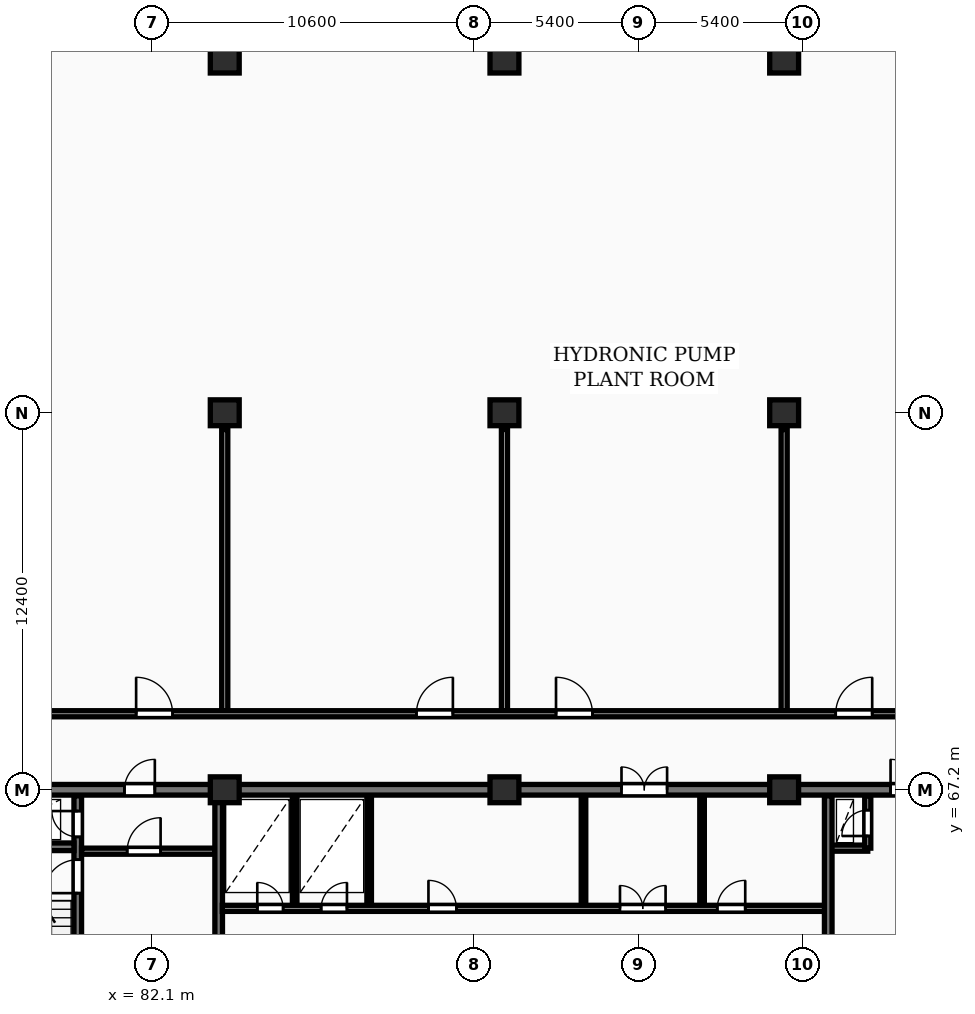
"""IFC4 building model, lengths in metres.
Left out: names, types, materials, properties, quantities, classifications, styles, units other than length and angle.
Written with IfcOpenShell. Run it as: python <this file> out.ifc"""

import sys

from ifc_helpers import new_model, si_unit, direction, frame, frame_2d, origin, origin_2d, place, context, subcontext, project, spatial, rectangle, extrude, element, fill, save


model = new_model("IFC4")
c1 = context("Model", 3, precision=1e-05, world=origin(), true_north=direction((0.0, 1.0)))
c2 = subcontext(c1, "Body", "Model", "MODEL_VIEW")
j1 = project(units=[si_unit("LENGTHUNIT", "METRE"), si_unit("PLANEANGLEUNIT", "RADIAN")], contexts=[c1])
p1 = place(None, origin())
s1 = spatial("IfcSite", under=j1, at=p1, CompositionType="ELEMENT")
p2 = place(p1, origin())
s2 = spatial("IfcBuilding", under=s1, at=p2, CompositionType="ELEMENT")
p3 = place(p2, frame((0.0, 0.0, 157.3)))
s3 = spatial("IfcBuildingStorey", under=s2, at=p3, CompositionType="ELEMENT", Elevation=157.3)
for number, where, z_axis, x_axis in (
    (1, (84.5, 67.2, 0.0), (0.0, 0.0, 1.0), (1.0, 0.0, 0.0)),
    (2, (84.5, 79.6, 0.0), (0.0, 0.0, 1.0), (1.0, 0.0, 0.0)),
    (3, (84.5, 91.2, 0.0), (0.0, 0.0, 1.0), (1.0, 0.0, 0.0)),
    (4, (93.7, 67.2, 0.0), (0.0, 0.0, 1.0), (1.0, 0.0, 0.0)),
    (5, (93.7, 79.6, 0.0), (0.0, 0.0, 1.0), (1.0, 0.0, 0.0)),
    (6, (93.7, 91.2, 0.0), (0.0, 0.0, 1.0), (1.0, 0.0, 0.0)),
    (7, (102.9, 67.2, 0.0), (0.0, 0.0, 1.0), (1.0, 0.0, 0.0)),
    (8, (102.9, 79.6, 0.0), (0.0, 0.0, 1.0), (1.0, 0.0, 0.0)),
    (9, (102.9, 91.2, 0.0), (0.0, 0.0, 1.0), (1.0, 0.0, 0.0)),
):
    element("IfcColumn", number, at=place(p3, frame(where, z_axis=z_axis, x_axis=x_axis)), inside=s3, PredefinedType="COLUMN", context=c2, shape_type="SweptSolid", body=[
        extrude(rectangle(XDim=0.95, YDim=0.85, at=origin_2d()), origin(), (0.0, 0.0, 1.0), 4.8),
    ])
p4 = place(p3, frame((75.95, 67.2, 0.0), z_axis=(0.0, 0.0, 1.0), x_axis=(1.0, 0.0, 0.0)))
e10 = element("IfcWall", 10, at=p4, inside=s3, PredefinedType="SHEAR", context=c2, shape_type="SweptSolid", body=[
    extrude(rectangle(XDim=36.3, YDim=0.35, at=frame_2d((18.15, 0.0))), origin(), (0.0, 0.0, 1.0), 4.8),
])
p5 = place(p4, frame((5.25, 0.0, 0.0)))
e11 = element("IfcOpeningElement", 11, at=p5, cuts=e10, PredefinedType="OPENING", context=c2, shape_type="SweptSolid", body=[
    extrude(rectangle(XDim=1.0, YDim=2.15, at=frame_2d((0.5, 1.075))), frame((0.0, 0.185, 0.0), z_axis=(0.0, -1.0, 0.0), x_axis=(1.0, 0.0, 0.0)), (0.0, 0.0, 1.0), 0.37),
])
p6 = place(p4, frame((21.6, 0.0, 0.0)))
e12 = element("IfcOpeningElement", 12, at=p6, cuts=e10, PredefinedType="OPENING", context=c2, shape_type="SweptSolid", body=[
    extrude(rectangle(XDim=1.5, YDim=2.2, at=frame_2d((0.75, 1.1))), frame((0.0, 0.185, 0.0), z_axis=(0.0, -1.0, 0.0), x_axis=(1.0, 0.0, 0.0)), (0.0, 0.0, 1.0), 0.37),
])
p7 = place(p4, frame((30.45, 0.0, 0.0)))
e13 = element("IfcOpeningElement", 13, at=p7, cuts=e10, PredefinedType="OPENING", context=c2, shape_type="SweptSolid", body=[
    extrude(rectangle(XDim=1.0, YDim=2.15, at=frame_2d((0.5, 1.075))), frame((0.0, 0.185, 0.0), z_axis=(0.0, -1.0, 0.0), x_axis=(1.0, 0.0, 0.0)), (0.0, 0.0, 1.0), 0.37),
])
p8 = place(p3, frame((79.665, 55.4, 0.0), z_axis=(0.0, 0.0, 1.0), x_axis=(0.0, 1.0, 0.0)))
e14 = element("IfcWall", 14, at=p8, inside=s3, PredefinedType="SHEAR", context=c2, shape_type="SweptSolid", body=[
    extrude(rectangle(XDim=11.6, YDim=0.25, at=frame_2d((5.8, 0.0))), origin(), (0.0, 0.0, 1.0), 4.8),
])
p9 = place(p8, frame((0.55, 0.0, 0.0)))
e15 = element("IfcOpeningElement", 15, at=p9, cuts=e14, PredefinedType="OPENING", context=c2, shape_type="SweptSolid", body=[
    extrude(rectangle(XDim=0.85, YDim=2.05, at=frame_2d((0.425, 1.025))), frame((0.0, 0.135, 0.0), z_axis=(0.0, -1.0, 0.0), x_axis=(1.0, 0.0, 0.0)), (0.0, 0.0, 1.0), 0.27),
])
p10 = place(p8, frame((8.4, 0.0, 0.0)))
e16 = element("IfcOpeningElement", 16, at=p10, cuts=e14, PredefinedType="OPENING", context=c2, shape_type="SweptSolid", body=[
    extrude(rectangle(XDim=1.1, YDim=2.1, at=frame_2d((0.55, 1.05))), frame((0.0, 0.135, 0.0), z_axis=(0.0, -1.0, 0.0), x_axis=(1.0, 0.0, 0.0)), (0.0, 0.0, 1.0), 0.27),
])
p11 = place(p8, frame((10.25, 0.0, 0.0)))
e17 = element("IfcOpeningElement", 17, at=p11, cuts=e14, PredefinedType="OPENING", context=c2, shape_type="SweptSolid", body=[
    extrude(rectangle(XDim=0.85, YDim=2.05, at=frame_2d((0.425, 1.025))), frame((0.0, 0.135, 0.0), z_axis=(0.0, -1.0, 0.0), x_axis=(1.0, 0.0, 0.0)), (0.0, 0.0, 1.0), 0.27),
])
p12 = place(p3, frame((76.3, 65.325, 0.0), z_axis=(0.0, 0.0, 1.0), x_axis=(1.0, 0.0, 0.0)))
e18 = element("IfcWall", 18, at=p12, inside=s3, PredefinedType="SHEAR", context=c2, shape_type="SweptSolid", body=[
    extrude(rectangle(XDim=3.24, YDim=0.25, at=frame_2d((1.62, 0.0))), origin(), (0.0, 0.0, 1.0), 4.8),
])
p13 = place(p3, frame((79.79, 65.18, 0.0), z_axis=(0.0, 0.0, 1.0), x_axis=(1.0, 0.0, 0.0)))
e19 = element("IfcWall", 19, at=p13, inside=s3, PredefinedType="PARTITIONING", context=c2, shape_type="SweptSolid", body=[
    extrude(rectangle(XDim=4.39, YDim=0.2, at=frame_2d((2.195, 0.0))), origin(), (0.0, 0.0, 1.0), 4.48),
])
p14 = place(p13, frame((1.5, 0.0, 0.0)))
e20 = element("IfcOpeningElement", 20, at=p14, cuts=e19, PredefinedType="OPENING", context=c2, shape_type="SweptSolid", body=[
    extrude(rectangle(XDim=1.1, YDim=2.1, at=frame_2d((0.55, 1.05))), frame((0.0, 0.11, 0.0), z_axis=(0.0, -1.0, 0.0), x_axis=(1.0, 0.0, 0.0)), (0.0, 0.0, 1.0), 0.22),
])
p15 = place(p3, frame((84.3, 55.4, 0.0), z_axis=(0.0, 0.0, 1.0), x_axis=(0.0, 1.0, 0.0)))
e21 = element("IfcWall", 21, at=p15, inside=s3, PredefinedType="SHEAR", context=c2, shape_type="SweptSolid", body=[
    extrude(rectangle(XDim=11.6, YDim=0.25, at=frame_2d((5.8, 0.0))), origin(), (0.0, 0.0, 1.0), 4.8),
])
p16 = place(p15, frame((5.2, 0.0, 0.0)))
e22 = element("IfcOpeningElement", 22, at=p16, cuts=e21, PredefinedType="OPENING", context=c2, shape_type="SweptSolid", body=[
    extrude(rectangle(XDim=1.1, YDim=2.1, at=frame_2d((0.55, 1.05))), frame((0.0, 0.135, 0.0), z_axis=(0.0, -1.0, 0.0), x_axis=(1.0, 0.0, 0.0)), (0.0, 0.0, 1.0), 0.27),
])
for number, where, z_axis, x_axis in (
    (23, (86.8, 63.4, 0.0), (0.0, 0.0, 1.0), (0.0, 1.0, 0.0)),
    (24, (89.25, 63.4, 0.0), (0.0, 0.0, 1.0), (0.0, 1.0, 0.0)),
    (25, (96.3, 63.4, 0.0), (0.0, 0.0, 1.0), (0.0, 1.0, 0.0)),
    (26, (100.2, 63.4, 0.0), (0.0, 0.0, 1.0), (0.0, 1.0, 0.0)),
):
    element("IfcWall", number, at=place(p3, frame(where, z_axis=z_axis, x_axis=x_axis)), inside=s3, PredefinedType="PARTITIONING", context=c2, shape_type="SweptSolid", body=[
        extrude(rectangle(XDim=3.6, YDim=0.15, at=frame_2d((1.8, 0.0))), origin(), (0.0, 0.0, 1.0), 4.48),
    ])
p17 = place(p3, frame((84.42, 63.3, 0.0), z_axis=(0.0, 0.0, 1.0), x_axis=(1.0, 0.0, 0.0)))
e27 = element("IfcWall", 27, at=p17, inside=s3, PredefinedType="PARTITIONING", context=c2, shape_type="SweptSolid", body=[
    extrude(rectangle(XDim=19.83, YDim=0.2, at=frame_2d((9.915, 0.0))), origin(), (0.0, 0.0, 1.0), 4.48),
])
p18 = place(p17, frame((1.15, 0.0, 0.0)))
e28 = element("IfcOpeningElement", 28, at=p18, cuts=e27, PredefinedType="OPENING", context=c2, shape_type="SweptSolid", body=[
    extrude(rectangle(XDim=0.85, YDim=2.05, at=frame_2d((0.425, 1.025))), frame((0.0, 0.11, 0.0), z_axis=(0.0, -1.0, 0.0), x_axis=(1.0, 0.0, 0.0)), (0.0, 0.0, 1.0), 0.22),
])
p19 = place(p17, frame((3.25, 0.0, 0.0)))
e29 = element("IfcOpeningElement", 29, at=p19, cuts=e27, PredefinedType="OPENING", context=c2, shape_type="SweptSolid", body=[
    extrude(rectangle(XDim=0.85, YDim=2.05, at=frame_2d((0.425, 1.025))), frame((0.0, 0.11, 0.0), z_axis=(0.0, -1.0, 0.0), x_axis=(1.0, 0.0, 0.0)), (0.0, 0.0, 1.0), 0.22),
])
p20 = place(p17, frame((13.08, 0.0, 0.0)))
e30 = element("IfcOpeningElement", 30, at=p20, cuts=e27, PredefinedType="OPENING", context=c2, shape_type="SweptSolid", body=[
    extrude(rectangle(XDim=1.5, YDim=2.2, at=frame_2d((0.75, 1.1))), frame((0.0, 0.11, 0.0), z_axis=(0.0, -1.0, 0.0), x_axis=(1.0, 0.0, 0.0)), (0.0, 0.0, 1.0), 0.22),
])
p21 = place(p17, frame((6.78, 0.0, 0.0)))
e31 = element("IfcOpeningElement", 31, at=p21, cuts=e27, PredefinedType="OPENING", context=c2, shape_type="SweptSolid", body=[
    extrude(rectangle(XDim=0.92, YDim=2.08, at=frame_2d((0.46, 1.04))), frame((0.0, 0.11, 0.0), z_axis=(0.0, -1.0, 0.0), x_axis=(1.0, 0.0, 0.0)), (0.0, 0.0, 1.0), 0.22),
])
p22 = place(p17, frame((16.28, 0.0, 0.0)))
e32 = element("IfcOpeningElement", 32, at=p22, cuts=e27, PredefinedType="OPENING", context=c2, shape_type="SweptSolid", body=[
    extrude(rectangle(XDim=0.92, YDim=2.08, at=frame_2d((0.46, 1.04))), frame((0.0, 0.11, 0.0), z_axis=(0.0, -1.0, 0.0), x_axis=(1.0, 0.0, 0.0)), (0.0, 0.0, 1.0), 0.22),
])
p23 = place(p3, frame((104.45, 65.28, 0.0), z_axis=(0.0, 0.0, 1.0), x_axis=(1.0, 0.0, 0.0)))
e33 = element("IfcWall", 33, at=p23, inside=s3, PredefinedType="PARTITIONING", context=c2, shape_type="SweptSolid", body=[
    extrude(rectangle(XDim=1.2, YDim=0.2, at=frame_2d((0.6, 0.0))), origin(), (0.0, 0.0, 1.0), 4.48),
])
p24 = place(p3, frame((105.65, 65.28, 0.0), z_axis=(0.0, 0.0, 1.0), x_axis=(0.0, 1.0, 0.0)))
e34 = element("IfcWall", 34, at=p24, inside=s3, PredefinedType="PARTITIONING", context=c2, shape_type="SweptSolid", body=[
    extrude(rectangle(XDim=1.72, YDim=0.2, at=frame_2d((0.86, 0.0))), origin(), (0.0, 0.0, 1.0), 4.48),
])
p25 = place(p24, frame((0.4, 0.0, 0.0)))
e35 = element("IfcOpeningElement", 35, at=p25, cuts=e34, PredefinedType="OPENING", context=c2, shape_type="SweptSolid", body=[
    extrude(rectangle(XDim=0.85, YDim=2.05, at=frame_2d((0.425, 1.025))), frame((0.0, 0.11, 0.0), z_axis=(0.0, -1.0, 0.0), x_axis=(1.0, 0.0, 0.0)), (0.0, 0.0, 1.0), 0.22),
])
p26 = place(p3, frame((104.35, 58.4, 0.0), z_axis=(0.0, 0.0, 1.0), x_axis=(0.0, 1.0, 0.0)))
e36 = element("IfcWall", 36, at=p26, inside=s3, PredefinedType="SHEAR", context=c2, shape_type="SweptSolid", body=[
    extrude(rectangle(XDim=8.6, YDim=0.25, at=frame_2d((4.3, 0.0))), origin(), (0.0, 0.0, 1.0), 4.8),
])
p27 = place(p26, frame((1.8, 0.0, 0.0)))
e37 = element("IfcOpeningElement", 37, at=p27, cuts=e36, PredefinedType="OPENING", context=c2, shape_type="SweptSolid", body=[
    extrude(rectangle(XDim=1.1, YDim=2.1, at=frame_2d((0.55, 1.05))), frame((0.0, 0.135, 0.0), z_axis=(0.0, -1.0, 0.0), x_axis=(1.0, 0.0, 0.0)), (0.0, 0.0, 1.0), 0.27),
])
for number, where, z_axis, x_axis in (
    (38, (84.5, 69.8, 0.0), (0.0, 0.0, 1.0), (0.0, 1.0, 0.0)),
    (39, (93.7, 69.8, 0.0), (0.0, 0.0, 1.0), (0.0, 1.0, 0.0)),
    (40, (102.9, 69.8, 0.0), (0.0, 0.0, 1.0), (0.0, 1.0, 0.0)),
):
    element("IfcWall", number, at=place(p3, frame(where, z_axis=z_axis, x_axis=x_axis)), inside=s3, PredefinedType="PARTITIONING", context=c2, shape_type="SweptSolid", body=[
        extrude(rectangle(XDim=9.25, YDim=0.2, at=frame_2d((4.625, 0.0))), origin(), (0.0, 0.0, 1.0), 3.23),
    ])
p28 = place(p3, frame((57.6, 69.7, 0.0), z_axis=(0.0, 0.0, 1.0), x_axis=(1.0, 0.0, 0.0)))
e41 = element("IfcWall", 41, at=p28, inside=s3, PredefinedType="PARTITIONING", context=c2, shape_type="SweptSolid", body=[
    extrude(rectangle(XDim=73.0, YDim=0.2, at=frame_2d((36.5, 0.0))), origin(), (0.0, 0.0, 1.0), 4.48),
])
p29 = place(p28, frame((7.498, 0.0, 0.0)))
e42 = element("IfcOpeningElement", 42, at=p29, cuts=e41, PredefinedType="OPENING", context=c2, shape_type="SweptSolid", body=[
    extrude(rectangle(XDim=1.2, YDim=2.15, at=frame_2d((0.6, 1.075))), frame((0.0, 0.11, 0.0), z_axis=(0.0, -1.0, 0.0), x_axis=(1.0, 0.0, 0.0)), (0.0, 0.0, 1.0), 0.22),
])
p30 = place(p28, frame((15.621, 0.0, 0.0)))
e43 = element("IfcOpeningElement", 43, at=p30, cuts=e41, PredefinedType="OPENING", context=c2, shape_type="SweptSolid", body=[
    extrude(rectangle(XDim=1.2, YDim=2.15, at=frame_2d((0.6, 1.075))), frame((0.0, 0.11, 0.0), z_axis=(0.0, -1.0, 0.0), x_axis=(1.0, 0.0, 0.0)), (0.0, 0.0, 1.0), 0.22),
])
p31 = place(p28, frame((23.985, 0.0, 0.0)))
e44 = element("IfcOpeningElement", 44, at=p31, cuts=e41, PredefinedType="OPENING", context=c2, shape_type="SweptSolid", body=[
    extrude(rectangle(XDim=1.2, YDim=2.15, at=frame_2d((0.6, 1.075))), frame((0.0, 0.11, 0.0), z_axis=(0.0, -1.0, 0.0), x_axis=(1.0, 0.0, 0.0)), (0.0, 0.0, 1.0), 0.22),
])
p32 = place(p28, frame((33.204, 0.0, 0.0)))
e45 = element("IfcOpeningElement", 45, at=p32, cuts=e41, PredefinedType="OPENING", context=c2, shape_type="SweptSolid", body=[
    extrude(rectangle(XDim=1.2, YDim=2.15, at=frame_2d((0.6, 1.075))), frame((0.0, 0.11, 0.0), z_axis=(0.0, -1.0, 0.0), x_axis=(1.0, 0.0, 0.0)), (0.0, 0.0, 1.0), 0.22),
])
p33 = place(p28, frame((37.796, 0.0, 0.0)))
e46 = element("IfcOpeningElement", 46, at=p33, cuts=e41, PredefinedType="OPENING", context=c2, shape_type="SweptSolid", body=[
    extrude(rectangle(XDim=1.2, YDim=2.15, at=frame_2d((0.6, 1.075))), frame((0.0, 0.11, 0.0), z_axis=(0.0, -1.0, 0.0), x_axis=(1.0, 0.0, 0.0)), (0.0, 0.0, 1.0), 0.22),
])
p34 = place(p28, frame((46.996, 0.0, 0.0)))
e47 = element("IfcOpeningElement", 47, at=p34, cuts=e41, PredefinedType="OPENING", context=c2, shape_type="SweptSolid", body=[
    extrude(rectangle(XDim=1.2, YDim=2.15, at=frame_2d((0.6, 1.075))), frame((0.0, 0.11, 0.0), z_axis=(0.0, -1.0, 0.0), x_axis=(1.0, 0.0, 0.0)), (0.0, 0.0, 1.0), 0.22),
])
p35 = place(p28, frame((56.191, 0.0, 0.0)))
e48 = element("IfcOpeningElement", 48, at=p35, cuts=e41, PredefinedType="OPENING", context=c2, shape_type="SweptSolid", body=[
    extrude(rectangle(XDim=1.2, YDim=2.15, at=frame_2d((0.6, 1.075))), frame((0.0, 0.11, 0.0), z_axis=(0.0, -1.0, 0.0), x_axis=(1.0, 0.0, 0.0)), (0.0, 0.0, 1.0), 0.22),
])
p36 = place(p28, frame((64.37, 0.0, 0.0)))
e49 = element("IfcOpeningElement", 49, at=p36, cuts=e41, PredefinedType="OPENING", context=c2, shape_type="SweptSolid", body=[
    extrude(rectangle(XDim=1.5, YDim=2.18, at=frame_2d((0.75, 1.09))), frame((0.0, 0.11, 0.0), z_axis=(0.0, -1.0, 0.0), x_axis=(1.0, 0.0, 0.0)), (0.0, 0.0, 1.0), 0.22),
])
p37 = place(p5, origin())
e50 = element("IfcDoor", 50, at=p37, inside=s3, OperationType="SINGLE_SWING_RIGHT", PredefinedType="DOOR", context=c2, shape_type="SweptSolid", body=[
    extrude(rectangle(XDim=1.0, YDim=2.15, at=frame_2d((0.5, 1.075))), frame((0.0, 0.025, 0.0), z_axis=(0.0, -1.0, 0.0), x_axis=(1.0, 0.0, 0.0)), (0.0, 0.0, 1.0), 0.05),
])
fill(e11, e50)
p38 = place(p6, origin())
e51 = element("IfcDoor", 51, at=p38, inside=s3, OperationType="DOUBLE_DOOR_SINGLE_SWING", PredefinedType="DOOR", context=c2, shape_type="SweptSolid", body=[
    extrude(rectangle(XDim=1.5, YDim=2.2, at=frame_2d((0.75, 1.1))), frame((0.0, 0.025, 0.0), z_axis=(0.0, -1.0, 0.0), x_axis=(1.0, 0.0, 0.0)), (0.0, 0.0, 1.0), 0.05),
])
fill(e12, e51)
p39 = place(p7, origin())
e52 = element("IfcDoor", 52, at=p39, inside=s3, OperationType="SINGLE_SWING_LEFT", PredefinedType="DOOR", context=c2, shape_type="SweptSolid", body=[
    extrude(rectangle(XDim=1.0, YDim=2.15, at=frame_2d((0.5, 1.075))), frame((0.0, 0.025, 0.0), z_axis=(0.0, -1.0, 0.0), x_axis=(1.0, 0.0, 0.0)), (0.0, 0.0, 1.0), 0.05),
])
fill(e13, e52)
p40 = place(p10, origin())
e53 = element("IfcDoor", 53, at=p40, inside=s3, OperationType="SINGLE_SWING_LEFT", PredefinedType="DOOR", context=c2, shape_type="SweptSolid", body=[
    extrude(rectangle(XDim=1.1, YDim=2.1, at=frame_2d((0.55, 1.05))), frame((0.0, 0.025, 0.0), z_axis=(0.0, -1.0, 0.0), x_axis=(1.0, 0.0, 0.0)), (0.0, 0.0, 1.0), 0.05),
])
fill(e16, e53)
p41 = place(p11, origin())
e54 = element("IfcDoor", 54, at=p41, inside=s3, OperationType="SINGLE_SWING_RIGHT", PredefinedType="DOOR", context=c2, shape_type="SweptSolid", body=[
    extrude(rectangle(XDim=0.85, YDim=2.05, at=frame_2d((0.425, 1.025))), frame((0.0, 0.025, 0.0), z_axis=(0.0, -1.0, 0.0), x_axis=(1.0, 0.0, 0.0)), (0.0, 0.0, 1.0), 0.05),
])
fill(e17, e54)
p42 = place(p14, origin())
e55 = element("IfcDoor", 55, at=p42, inside=s3, OperationType="SINGLE_SWING_RIGHT", PredefinedType="DOOR", context=c2, shape_type="SweptSolid", body=[
    extrude(rectangle(XDim=1.1, YDim=2.1, at=frame_2d((0.55, 1.05))), frame((0.0, 0.025, 0.0), z_axis=(0.0, -1.0, 0.0), x_axis=(1.0, 0.0, 0.0)), (0.0, 0.0, 1.0), 0.05),
])
fill(e20, e55)
p43 = place(p18, origin())
e56 = element("IfcDoor", 56, at=p43, inside=s3, OperationType="SINGLE_SWING_LEFT", PredefinedType="DOOR", context=c2, shape_type="SweptSolid", body=[
    extrude(rectangle(XDim=0.85, YDim=2.05, at=frame_2d((0.425, 1.025))), frame((0.0, 0.025, 0.0), z_axis=(0.0, -1.0, 0.0), x_axis=(1.0, 0.0, 0.0)), (0.0, 0.0, 1.0), 0.05),
])
fill(e28, e56)
p44 = place(p19, origin())
e57 = element("IfcDoor", 57, at=p44, inside=s3, OperationType="SINGLE_SWING_RIGHT", PredefinedType="DOOR", context=c2, shape_type="SweptSolid", body=[
    extrude(rectangle(XDim=0.85, YDim=2.05, at=frame_2d((0.425, 1.025))), frame((0.0, 0.025, 0.0), z_axis=(0.0, -1.0, 0.0), x_axis=(1.0, 0.0, 0.0)), (0.0, 0.0, 1.0), 0.05),
])
fill(e29, e57)
p45 = place(p20, origin())
e58 = element("IfcDoor", 58, at=p45, inside=s3, OperationType="DOUBLE_DOOR_SINGLE_SWING", PredefinedType="DOOR", context=c2, shape_type="SweptSolid", body=[
    extrude(rectangle(XDim=1.5, YDim=2.2, at=frame_2d((0.75, 1.1))), frame((0.0, 0.025, 0.0), z_axis=(0.0, -1.0, 0.0), x_axis=(1.0, 0.0, 0.0)), (0.0, 0.0, 1.0), 0.05),
])
fill(e30, e58)
p46 = place(p21, origin())
e59 = element("IfcDoor", 59, at=p46, inside=s3, OperationType="SINGLE_SWING_LEFT", PredefinedType="DOOR", context=c2, shape_type="SweptSolid", body=[
    extrude(rectangle(XDim=0.92, YDim=2.08, at=frame_2d((0.46, 1.04))), frame((0.0, 0.025, 0.0), z_axis=(0.0, -1.0, 0.0), x_axis=(1.0, 0.0, 0.0)), (0.0, 0.0, 1.0), 0.05),
])
fill(e31, e59)
p47 = place(p22, origin())
e60 = element("IfcDoor", 60, at=p47, inside=s3, OperationType="SINGLE_SWING_RIGHT", PredefinedType="DOOR", context=c2, shape_type="SweptSolid", body=[
    extrude(rectangle(XDim=0.92, YDim=2.08, at=frame_2d((0.46, 1.04))), frame((0.0, 0.025, 0.0), z_axis=(0.0, -1.0, 0.0), x_axis=(1.0, 0.0, 0.0)), (0.0, 0.0, 1.0), 0.05),
])
fill(e32, e60)
p48 = place(p25, origin())
e61 = element("IfcDoor", 61, at=p48, inside=s3, OperationType="SINGLE_SWING_LEFT", PredefinedType="DOOR", context=c2, shape_type="SweptSolid", body=[
    extrude(rectangle(XDim=0.85, YDim=2.05, at=frame_2d((0.425, 1.025))), frame((0.0, 0.025, 0.0), z_axis=(0.0, -1.0, 0.0), x_axis=(1.0, 0.0, 0.0)), (0.0, 0.0, 1.0), 0.05),
])
fill(e35, e61)
p49 = place(p31, origin())
e62 = element("IfcDoor", 62, at=p49, inside=s3, OperationType="SINGLE_SWING_LEFT", PredefinedType="DOOR", context=c2, shape_type="SweptSolid", body=[
    extrude(rectangle(XDim=1.2, YDim=2.15, at=frame_2d((0.6, 1.075))), frame((0.0, 0.025, 0.0), z_axis=(0.0, -1.0, 0.0), x_axis=(1.0, 0.0, 0.0)), (0.0, 0.0, 1.0), 0.05),
])
fill(e44, e62)
p50 = place(p32, origin())
e63 = element("IfcDoor", 63, at=p50, inside=s3, OperationType="SINGLE_SWING_RIGHT", PredefinedType="DOOR", context=c2, shape_type="SweptSolid", body=[
    extrude(rectangle(XDim=1.2, YDim=2.15, at=frame_2d((0.6, 1.075))), frame((0.0, 0.025, 0.0), z_axis=(0.0, -1.0, 0.0), x_axis=(1.0, 0.0, 0.0)), (0.0, 0.0, 1.0), 0.05),
])
fill(e45, e63)
p51 = place(p33, origin())
e64 = element("IfcDoor", 64, at=p51, inside=s3, OperationType="SINGLE_SWING_LEFT", PredefinedType="DOOR", context=c2, shape_type="SweptSolid", body=[
    extrude(rectangle(XDim=1.2, YDim=2.15, at=frame_2d((0.6, 1.075))), frame((0.0, 0.025, 0.0), z_axis=(0.0, -1.0, 0.0), x_axis=(1.0, 0.0, 0.0)), (0.0, 0.0, 1.0), 0.05),
])
fill(e46, e64)
p52 = place(p34, origin())
e65 = element("IfcDoor", 65, at=p52, inside=s3, OperationType="SINGLE_SWING_RIGHT", PredefinedType="DOOR", context=c2, shape_type="SweptSolid", body=[
    extrude(rectangle(XDim=1.2, YDim=2.15, at=frame_2d((0.6, 1.075))), frame((0.0, 0.025, 0.0), z_axis=(0.0, -1.0, 0.0), x_axis=(1.0, 0.0, 0.0)), (0.0, 0.0, 1.0), 0.05),
])
fill(e47, e65)
save(model, sys.argv[1])
